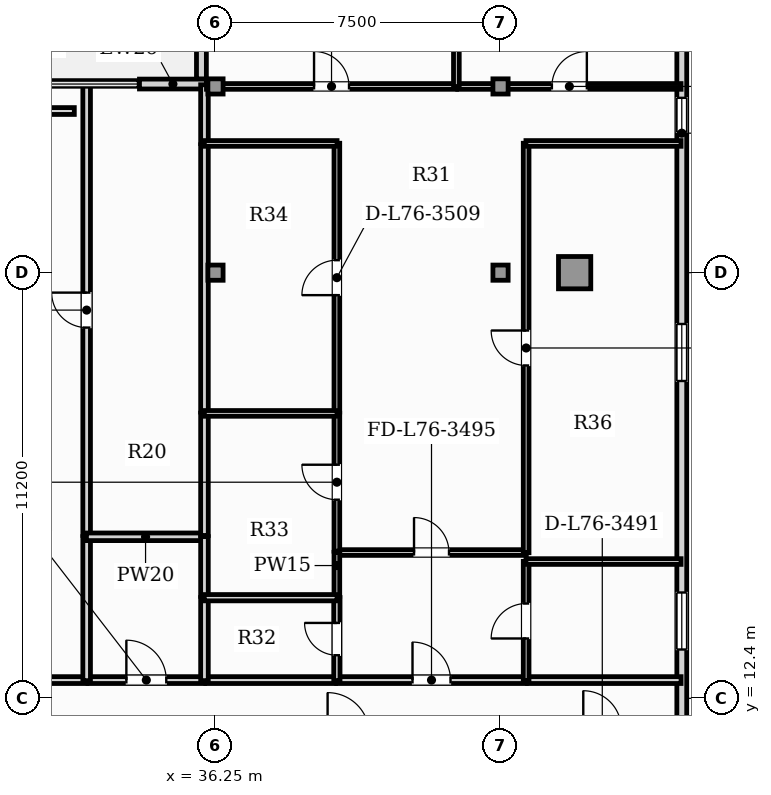
"""IFC4 building model, lengths in metres.
Left out: names, types, materials, properties, quantities, classifications, styles, units other than length and angle.
Written with IfcOpenShell. Run it as: python <this file> out.ifc"""

import sys

from ifc_helpers import new_model, si_unit, direction, frame, frame_2d, origin, origin_2d, place, context, subcontext, project, spatial, rectangle, hollow_rectangle, extrude, element, fill, save


model = new_model("IFC4")
c1 = context("Model", 3, precision=1e-05, world=origin(), true_north=direction((0.0, 1.0)))
c2 = subcontext(c1, "Body", "Model", "MODEL_VIEW")
j1 = project(units=[si_unit("LENGTHUNIT", "METRE"), si_unit("PLANEANGLEUNIT", "RADIAN")], contexts=[c1])
p1 = place(None, origin())
s1 = spatial("IfcSite", under=j1, at=p1, CompositionType="ELEMENT")
p2 = place(p1, origin())
s2 = spatial("IfcBuilding", under=s1, at=p2, CompositionType="ELEMENT")
p3 = place(p2, frame((0.0, 0.0, 308.0)))
s3 = spatial("IfcBuildingStorey", under=s2, at=p3, CompositionType="ELEMENT", Elevation=308.0)
p4 = place(p3, frame((45.7, 23.6, 0.0), z_axis=(0.0, 0.0, 1.0), x_axis=(1.0, 0.0, 0.0)))
e1 = element("IfcColumn", 1, at=p4, inside=s3, PredefinedType="USERDEFINED", context=c2, shape_type="SweptSolid", body=[
    extrude(hollow_rectangle(XDim=0.85, YDim=0.85, WallThickness=0.05, at=origin_2d()), origin(), (0.0, 0.0, 1.0), 5.05),
])
for number, where, z_axis, x_axis in (
    (2, (36.25, 23.6, 0.0), (0.0, 0.0, 1.0), (1.0, 0.0, 0.0)),
    (3, (43.75, 23.6, 0.0), (0.0, 0.0, 1.0), (1.0, 0.0, 0.0)),
    (4, (36.25, 28.5, 0.0), (0.0, 0.0, 1.0), (1.0, 0.0, 0.0)),
    (5, (43.75, 28.5, 0.0), (0.0, 0.0, 1.0), (1.0, 0.0, 0.0)),
):
    element("IfcColumn", number, at=place(p3, frame(where, z_axis=z_axis, x_axis=x_axis)), inside=s3, PredefinedType="COLUMN", context=c2, shape_type="SweptSolid", body=[
        extrude(hollow_rectangle(XDim=0.4, YDim=0.4, WallThickness=0.02, at=origin_2d()), origin(), (0.0, 0.0, 1.0), 5.05),
    ])
p5 = place(p3, frame((48.519, 3.24, 0.0), z_axis=(0.0, 0.0, 1.0), x_axis=(0.0, 1.0, 0.0)))
e6 = element("IfcWall", 6, at=p5, inside=s3, PredefinedType="SOLIDWALL", context=c2, shape_type="SweptSolid", body=[
    extrude(rectangle(XDim=26.813, YDim=0.26, at=frame_2d((13.406, 0.0))), origin(), (0.0, 0.0, 1.0), 4.85),
])
p6 = place(p5, frame((24.06, 0.0, 0.95)))
e7 = element("IfcOpeningElement", 7, at=p6, cuts=e6, PredefinedType="OPENING", context=c2, shape_type="SweptSolid", body=[
    extrude(rectangle(XDim=0.9, YDim=1.5, at=frame_2d((0.45, 0.75))), frame((0.0, 0.14, 0.0), z_axis=(0.0, -1.0, 0.0), x_axis=(1.0, 0.0, 0.0)), (0.0, 0.0, 1.0), 0.28),
])
p7 = place(p5, frame((10.445, 0.0, 0.9)))
e8 = element("IfcOpeningElement", 8, at=p7, cuts=e6, PredefinedType="OPENING", context=c2, shape_type="SweptSolid", body=[
    extrude(rectangle(XDim=1.5, YDim=1.95, at=frame_2d((0.75, 0.975))), frame((0.0, 0.14, 0.0), z_axis=(0.0, -1.0, 0.0), x_axis=(1.0, 0.0, 0.0)), (0.0, 0.0, 1.0), 0.28),
])
p8 = place(p5, frame((17.51, 0.0, 0.9)))
e9 = element("IfcOpeningElement", 9, at=p8, cuts=e6, PredefinedType="OPENING", context=c2, shape_type="SweptSolid", body=[
    extrude(rectangle(XDim=1.5, YDim=1.95, at=frame_2d((0.75, 0.975))), frame((0.0, 0.14, 0.0), z_axis=(0.0, -1.0, 0.0), x_axis=(1.0, 0.0, 0.0)), (0.0, 0.0, 1.0), 0.28),
])
p9 = place(p3, frame((35.88, 33.253, 0.0), z_axis=(0.0, 0.0, 1.0), x_axis=(0.0, -1.0, 0.0)))
e10 = element("IfcWall", 10, at=p9, inside=s3, PredefinedType="SOLIDWALL", context=c2, shape_type="SweptSolid", body=[
    extrude(rectangle(XDim=4.56, YDim=0.26, at=frame_2d((2.28, 0.0))), origin(), (0.0, 0.0, 1.0), 4.85),
])
p10 = place(p3, frame((34.25, 28.563, 0.0), z_axis=(0.0, 0.0, 1.0), x_axis=(1.0, 0.0, 0.0)))
e11 = element("IfcWall", 11, at=p10, inside=s3, PredefinedType="SOLIDWALL", context=c2, shape_type="SweptSolid", body=[
    extrude(rectangle(XDim=1.76, YDim=0.26, at=frame_2d((0.88, 0.0))), origin(), (0.0, 0.0, 1.0), 4.85),
])
p11 = place(p3, frame((21.535, 12.88, 0.0), z_axis=(0.0, 0.0, 1.0), x_axis=(1.0, 0.0, 0.0)))
e12 = element("IfcWall", 12, at=p11, inside=s3, PredefinedType="PARTITIONING", context=c2, shape_type="SweptSolid", body=[
    extrude(rectangle(XDim=11.33, YDim=0.18, at=frame_2d((5.665, 0.0))), origin(), (0.0, 0.0, 1.0), 4.85),
])
p12 = place(p11, frame((3.466, 0.0, 0.0)))
e13 = element("IfcOpeningElement", 13, at=p12, cuts=e12, PredefinedType="OPENING", context=c2, shape_type="SweptSolid", body=[
    extrude(rectangle(XDim=1.0, YDim=2.15, at=frame_2d((0.5, 1.075))), frame((0.0, 0.1, 0.0), z_axis=(0.0, -1.0, 0.0), x_axis=(1.0, 0.0, 0.0)), (0.0, 0.0, 1.0), 0.2),
])
p13 = place(p3, frame((32.895, 12.88, 0.0), z_axis=(0.0, 0.0, 1.0), x_axis=(1.0, 0.0, 0.0)))
e14 = element("IfcWall", 14, at=p13, inside=s3, PredefinedType="PARTITIONING", context=c2, shape_type="SweptSolid", body=[
    extrude(rectangle(XDim=3.07, YDim=0.18, at=frame_2d((1.535, 0.0))), origin(), (0.0, 0.0, 1.0), 4.85),
])
p14 = place(p13, frame((1.01, 0.0, 0.0)))
e15 = element("IfcOpeningElement", 15, at=p14, cuts=e14, PredefinedType="OPENING", context=c2, shape_type="SweptSolid", body=[
    extrude(rectangle(XDim=1.05, YDim=2.15, at=frame_2d((0.525, 1.075))), frame((0.0, 0.1, 0.0), z_axis=(0.0, -1.0, 0.0), x_axis=(1.0, 0.0, 0.0)), (0.0, 0.0, 1.0), 0.2),
])
p15 = place(p3, frame((39.439, 12.88, 0.0), z_axis=(0.0, 0.0, 1.0), x_axis=(1.0, 0.0, 0.0)))
e16 = element("IfcWall", 16, at=p15, inside=s3, PredefinedType="PARTITIONING", context=c2, shape_type="SweptSolid", body=[
    extrude(rectangle(XDim=4.99, YDim=0.18, at=frame_2d((2.495, 0.0))), origin(), (0.0, 0.0, 1.0), 4.85),
])
p16 = place(p15, frame((1.995, 0.0, 0.0)))
e17 = element("IfcOpeningElement", 17, at=p16, cuts=e16, PredefinedType="OPENING", context=c2, shape_type="SweptSolid", body=[
    extrude(rectangle(XDim=1.0, YDim=2.15, at=frame_2d((0.5, 1.075))), frame((0.0, 0.1, 0.0), z_axis=(0.0, -1.0, 0.0), x_axis=(1.0, 0.0, 0.0)), (0.0, 0.0, 1.0), 0.2),
])
p17 = place(p3, frame((35.995, 12.88, 0.0), z_axis=(0.0, 0.0, 1.0), x_axis=(1.0, 0.0, 0.0)))
e18 = element("IfcWall", 18, at=p17, inside=s3, PredefinedType="PARTITIONING", context=c2, shape_type="SweptSolid", body=[
    extrude(rectangle(XDim=3.414, YDim=0.18, at=frame_2d((1.707, 0.0))), origin(), (0.0, 0.0, 1.0), 4.85),
])
p18 = place(p3, frame((44.459, 12.88, 0.0), z_axis=(0.0, 0.0, 1.0), x_axis=(1.0, 0.0, 0.0)))
e19 = element("IfcWall", 19, at=p18, inside=s3, PredefinedType="PARTITIONING", context=c2, shape_type="SweptSolid", body=[
    extrude(rectangle(XDim=4.041, YDim=0.18, at=frame_2d((2.021, 0.0))), origin(), (0.0, 0.0, 1.0), 4.85),
])
p19 = place(p3, frame((32.86, 12.865, 0.0), z_axis=(0.0, 0.0, 1.0), x_axis=(0.0, 1.0, 0.0)))
e20 = element("IfcWall", 20, at=p19, inside=s3, PredefinedType="PARTITIONING", context=c2, shape_type="SweptSolid", body=[
    extrude(rectangle(XDim=3.79, YDim=0.2, at=frame_2d((1.895, 0.0))), origin(), (0.0, 0.0, 1.0), 4.85),
])
p20 = place(p3, frame((32.86, 16.685, 0.0), z_axis=(0.0, 0.0, 1.0), x_axis=(0.0, 1.0, 0.0)))
e21 = element("IfcWall", 21, at=p20, inside=s3, PredefinedType="PARTITIONING", context=c2, shape_type="SweptSolid", body=[
    extrude(rectangle(XDim=11.86, YDim=0.2, at=frame_2d((5.93, 0.0))), origin(), (0.0, 0.0, 1.0), 4.85),
])
p21 = place(p20, frame((5.47, 0.0, 0.0)))
e22 = element("IfcOpeningElement", 22, at=p21, cuts=e21, PredefinedType="OPENING", context=c2, shape_type="SweptSolid", body=[
    extrude(rectangle(XDim=0.92, YDim=2.1, at=frame_2d((0.46, 1.05))), frame((0.0, 0.11, 0.0), z_axis=(0.0, -1.0, 0.0), x_axis=(1.0, 0.0, 0.0)), (0.0, 0.0, 1.0), 0.22),
])
p22 = place(p3, frame((32.855, 16.65, 0.0), z_axis=(0.0, 0.0, 1.0), x_axis=(1.0, 0.0, 0.0)))
e23 = element("IfcWall", 23, at=p22, inside=s3, PredefinedType="PARTITIONING", context=c2, shape_type="SweptSolid", body=[
    extrude(rectangle(XDim=3.11, YDim=0.2, at=frame_2d((1.555, 0.0))), origin(), (0.0, 0.0, 1.0), 4.85),
])
p23 = place(p3, frame((35.96, 12.865, 0.0), z_axis=(0.0, 0.0, 1.0), x_axis=(0.0, 1.0, 0.0)))
e24 = element("IfcWall", 24, at=p23, inside=s3, PredefinedType="PARTITIONING", context=c2, shape_type="SweptSolid", body=[
    extrude(rectangle(XDim=2.188, YDim=0.2, at=frame_2d((1.094, 0.0))), origin(), (0.0, 0.0, 1.0), 4.85),
])
p24 = place(p3, frame((35.96, 15.083, 0.0), z_axis=(0.0, 0.0, 1.0), x_axis=(0.0, 1.0, 0.0)))
e25 = element("IfcWall", 25, at=p24, inside=s3, PredefinedType="PARTITIONING", context=c2, shape_type="SweptSolid", body=[
    extrude(rectangle(XDim=1.573, YDim=0.2, at=frame_2d((0.786, 0.0))), origin(), (0.0, 0.0, 1.0), 4.85),
])
p25 = place(p3, frame((35.96, 26.995, 0.0), z_axis=(0.0, 0.0, 1.0), x_axis=(0.0, 1.0, 0.0)))
e26 = element("IfcWall", 26, at=p25, inside=s3, PredefinedType="PARTITIONING", context=c2, shape_type="SweptSolid", body=[
    extrude(rectangle(XDim=1.549, YDim=0.2, at=frame_2d((0.774, 0.0))), origin(), (0.0, 0.0, 1.0), 4.85),
])
p26 = place(p3, frame((35.96, 16.685, 0.0), z_axis=(0.0, 0.0, 1.0), x_axis=(0.0, 1.0, 0.0)))
e27 = element("IfcWall", 27, at=p26, inside=s3, PredefinedType="PARTITIONING", context=c2, shape_type="SweptSolid", body=[
    extrude(rectangle(XDim=3.217, YDim=0.2, at=frame_2d((1.608, 0.0))), origin(), (0.0, 0.0, 1.0), 4.85),
])
p27 = place(p3, frame((35.96, 19.932, 0.0), z_axis=(0.0, 0.0, 1.0), x_axis=(0.0, 1.0, 0.0)))
e28 = element("IfcWall", 28, at=p27, inside=s3, PredefinedType="PARTITIONING", context=c2, shape_type="SweptSolid", body=[
    extrude(rectangle(XDim=7.033, YDim=0.2, at=frame_2d((3.517, 0.0))), origin(), (0.0, 0.0, 1.0), 4.85),
])
p28 = place(p3, frame((39.439, 16.236, 0.0), z_axis=(0.0, 0.0, 1.0), x_axis=(1.0, 0.0, 0.0)))
e29 = element("IfcWall", 29, at=p28, inside=s3, PredefinedType="PARTITIONING", context=c2, shape_type="SweptSolid", body=[
    extrude(rectangle(XDim=4.99, YDim=0.15, at=frame_2d((2.495, 0.0))), origin(), (0.0, 0.0, 1.0), 4.85),
])
p29 = place(p28, frame((2.035, 0.0, 0.0)))
e30 = element("IfcOpeningElement", 30, at=p29, cuts=e29, PredefinedType="OPENING", context=c2, shape_type="SweptSolid", body=[
    extrude(rectangle(XDim=0.92, YDim=2.1, at=frame_2d((0.46, 1.05))), frame((0.0, 0.085, 0.0), z_axis=(0.0, -1.0, 0.0), x_axis=(1.0, 0.0, 0.0)), (0.0, 0.0, 1.0), 0.17),
])
p30 = place(p3, frame((39.444, 12.865, 0.0), z_axis=(0.0, 0.0, 1.0), x_axis=(0.0, 1.0, 0.0)))
e31 = element("IfcWall", 31, at=p30, inside=s3, PredefinedType="PLUMBINGWALL", context=c2, shape_type="SweptSolid", body=[
    extrude(rectangle(XDim=2.188, YDim=0.165, at=frame_2d((1.094, 0.0))), origin(), (0.0, 0.0, 1.0), 4.85),
])
p31 = place(p30, frame((0.669, 0.0, 0.0)))
e32 = element("IfcOpeningElement", 32, at=p31, cuts=e31, PredefinedType="OPENING", context=c2, shape_type="SweptSolid", body=[
    extrude(rectangle(XDim=0.85, YDim=2.1, at=frame_2d((0.425, 1.05))), frame((0.0, 0.093, 0.0), z_axis=(0.0, -1.0, 0.0), x_axis=(1.0, 0.0, 0.0)), (0.0, 0.0, 1.0), 0.185),
])
p32 = place(p3, frame((39.444, 15.083, 0.0), z_axis=(0.0, 0.0, 1.0), x_axis=(0.0, 1.0, 0.0)))
e33 = element("IfcWall", 33, at=p32, inside=s3, PredefinedType="PARTITIONING", context=c2, shape_type="SweptSolid", body=[
    extrude(rectangle(XDim=1.159, YDim=0.15, at=frame_2d((0.579, 0.0))), origin(), (0.0, 0.0, 1.0), 4.85),
])
p33 = place(p3, frame((44.424, 12.865, 0.0), z_axis=(0.0, 0.0, 1.0), x_axis=(0.0, 1.0, 0.0)))
e34 = element("IfcWall", 34, at=p33, inside=s3, PredefinedType="PARTITIONING", context=c2, shape_type="SweptSolid", body=[
    extrude(rectangle(XDim=3.139, YDim=0.15, at=frame_2d((1.57, 0.0))), origin(), (0.0, 0.0, 1.0), 4.85),
])
p34 = place(p33, frame((1.11, 0.0, 0.0)))
e35 = element("IfcOpeningElement", 35, at=p34, cuts=e34, PredefinedType="OPENING", context=c2, shape_type="SweptSolid", body=[
    extrude(rectangle(XDim=0.92, YDim=2.1, at=frame_2d((0.46, 1.05))), frame((0.0, 0.085, 0.0), z_axis=(0.0, -1.0, 0.0), x_axis=(1.0, 0.0, 0.0)), (0.0, 0.0, 1.0), 0.17),
])
p35 = place(p3, frame((39.444, 16.271, 0.0), z_axis=(0.0, 0.0, 1.0), x_axis=(0.0, 1.0, 0.0)))
e36 = element("IfcWall", 36, at=p35, inside=s3, PredefinedType="PARTITIONING", context=c2, shape_type="SweptSolid", body=[
    extrude(rectangle(XDim=3.631, YDim=0.15, at=frame_2d((1.815, 0.0))), origin(), (0.0, 0.0, 1.0), 4.85),
])
p36 = place(p35, frame((1.355, 0.0, 0.0)))
e37 = element("IfcOpeningElement", 37, at=p36, cuts=e36, PredefinedType="OPENING", context=c2, shape_type="SweptSolid", body=[
    extrude(rectangle(XDim=0.92, YDim=2.1, at=frame_2d((0.46, 1.05))), frame((0.0, 0.085, 0.0), z_axis=(0.0, -1.0, 0.0), x_axis=(1.0, 0.0, 0.0)), (0.0, 0.0, 1.0), 0.17),
])
p37 = place(p3, frame((39.444, 19.932, 0.0), z_axis=(0.0, 0.0, 1.0), x_axis=(0.0, 1.0, 0.0)))
e38 = element("IfcWall", 38, at=p37, inside=s3, PredefinedType="PARTITIONING", context=c2, shape_type="SweptSolid", body=[
    extrude(rectangle(XDim=7.073, YDim=0.15, at=frame_2d((3.537, 0.0))), origin(), (0.0, 0.0, 1.0), 4.85),
])
p38 = place(p37, frame((3.076, 0.0, 0.0)))
e39 = element("IfcOpeningElement", 39, at=p38, cuts=e38, PredefinedType="OPENING", context=c2, shape_type="SweptSolid", body=[
    extrude(rectangle(XDim=0.92, YDim=2.1, at=frame_2d((0.46, 1.05))), frame((0.0, 0.085, 0.0), z_axis=(0.0, -1.0, 0.0), x_axis=(1.0, 0.0, 0.0)), (0.0, 0.0, 1.0), 0.17),
])
p39 = place(p3, frame((35.955, 27.0, 0.0), z_axis=(0.0, 0.0, 1.0), x_axis=(1.0, 0.0, 0.0)))
e40 = element("IfcWall", 40, at=p39, inside=s3, PredefinedType="PARTITIONING", context=c2, shape_type="SweptSolid", body=[
    extrude(rectangle(XDim=3.494, YDim=0.15, at=frame_2d((1.747, 0.0))), origin(), (0.0, 0.0, 1.0), 4.85),
])
p40 = place(p3, frame((44.424, 16.231, 0.0), z_axis=(0.0, 0.0, 1.0), x_axis=(0.0, 1.0, 0.0)))
e41 = element("IfcWall", 41, at=p40, inside=s3, PredefinedType="PARTITIONING", context=c2, shape_type="SweptSolid", body=[
    extrude(rectangle(XDim=10.774, YDim=0.15, at=frame_2d((5.387, 0.0))), origin(), (0.0, 0.0, 1.0), 4.85),
])
p41 = place(p40, frame((4.927, 0.0, 0.0)))
e42 = element("IfcOpeningElement", 42, at=p41, cuts=e41, PredefinedType="OPENING", context=c2, shape_type="SweptSolid", body=[
    extrude(rectangle(XDim=0.92, YDim=2.1, at=frame_2d((0.46, 1.05))), frame((0.0, 0.085, 0.0), z_axis=(0.0, -1.0, 0.0), x_axis=(1.0, 0.0, 0.0)), (0.0, 0.0, 1.0), 0.17),
])
p42 = place(p3, frame((44.419, 27.0, 0.0), z_axis=(0.0, 0.0, 1.0), x_axis=(1.0, 0.0, 0.0)))
e43 = element("IfcWall", 43, at=p42, inside=s3, PredefinedType="PARTITIONING", context=c2, shape_type="SweptSolid", body=[
    extrude(rectangle(XDim=4.081, YDim=0.15, at=frame_2d((2.041, 0.0))), origin(), (0.0, 0.0, 1.0), 4.85),
])
p43 = place(p3, frame((36.013, 28.5, 0.0), z_axis=(0.0, 0.0, 1.0), x_axis=(1.0, 0.0, 0.0)))
e44 = element("IfcWall", 44, at=p43, inside=s3, PredefinedType="PARTITIONING", context=c2, shape_type="SweptSolid", body=[
    extrude(rectangle(XDim=6.58, YDim=0.15, at=frame_2d((3.29, 0.0))), origin(), (0.0, 0.0, 1.0), 4.317),
])
p44 = place(p43, frame((2.83, 0.0, 0.0)))
e45 = element("IfcOpeningElement", 45, at=p44, cuts=e44, PredefinedType="OPENING", context=c2, shape_type="SweptSolid", body=[
    extrude(rectangle(XDim=0.92, YDim=2.1, at=frame_2d((0.46, 1.05))), frame((0.0, 0.085, 0.0), z_axis=(0.0, -1.0, 0.0), x_axis=(1.0, 0.0, 0.0)), (0.0, 0.0, 1.0), 0.17),
])
p45 = place(p3, frame((42.623, 28.5, 0.0), z_axis=(0.0, 0.0, 1.0), x_axis=(1.0, 0.0, 0.0)))
e46 = element("IfcWall", 46, at=p45, inside=s3, PredefinedType="PARTITIONING", context=c2, shape_type="SweptSolid", body=[
    extrude(rectangle(XDim=5.876, YDim=0.15, at=frame_2d((2.938, 0.0))), origin(), (0.0, 0.0, 1.0), 4.317),
])
p46 = place(p45, frame((2.478, 0.0, 0.0)))
e47 = element("IfcOpeningElement", 47, at=p46, cuts=e46, PredefinedType="OPENING", context=c2, shape_type="SweptSolid", body=[
    extrude(rectangle(XDim=0.92, YDim=2.1, at=frame_2d((0.46, 1.05))), frame((0.0, 0.085, 0.0), z_axis=(0.0, -1.0, 0.0), x_axis=(1.0, 0.0, 0.0)), (0.0, 0.0, 1.0), 0.17),
])
p47 = place(p3, frame((35.955, 15.048, 0.0), z_axis=(0.0, 0.0, 1.0), x_axis=(1.0, 0.0, 0.0)))
e48 = element("IfcWall", 48, at=p47, inside=s3, PredefinedType="PLUMBINGWALL", context=c2, shape_type="SweptSolid", body=[
    extrude(rectangle(XDim=3.494, YDim=0.165, at=frame_2d((1.747, 0.0))), origin(), (0.0, 0.0, 1.0), 4.85),
])
p48 = place(p3, frame((35.955, 19.897, 0.0), z_axis=(0.0, 0.0, 1.0), x_axis=(1.0, 0.0, 0.0)))
e49 = element("IfcWall", 49, at=p48, inside=s3, PredefinedType="PARTITIONING", context=c2, shape_type="SweptSolid", body=[
    extrude(rectangle(XDim=3.494, YDim=0.15, at=frame_2d((1.747, 0.0))), origin(), (0.0, 0.0, 1.0), 4.85),
])
p49 = place(p3, frame((44.419, 15.999, 0.0), z_axis=(0.0, 0.0, 1.0), x_axis=(1.0, 0.0, 0.0)))
e50 = element("IfcWall", 50, at=p49, inside=s3, PredefinedType="PARTITIONING", context=c2, shape_type="SweptSolid", body=[
    extrude(rectangle(XDim=4.081, YDim=0.15, at=frame_2d((2.041, 0.0))), origin(), (0.0, 0.0, 1.0), 4.85),
])
p50 = place(p3, frame((42.588, 28.495, 0.0), z_axis=(0.0, 0.0, 1.0), x_axis=(0.0, 1.0, 0.0)))
e51 = element("IfcWall", 51, at=p50, inside=s3, PredefinedType="PARTITIONING", context=c2, shape_type="SweptSolid", body=[
    extrude(rectangle(XDim=4.648, YDim=0.15, at=frame_2d((2.324, 0.0))), origin(), (0.0, 0.0, 1.0), 4.85),
])
p51 = place(p3, frame((24.183, 27.853, 0.0), z_axis=(0.0, 0.0, 1.0), x_axis=(1.0, 0.0, 0.0)))
e52 = element("IfcWall", 52, at=p51, inside=s3, PredefinedType="PARTITIONING", context=c2, shape_type="SweptSolid", body=[
    extrude(rectangle(XDim=8.352, YDim=0.18, at=frame_2d((4.176, 0.0))), origin(), (0.0, 0.0, 1.0), 4.85),
])
p52 = place(p6, origin())
e53 = element("IfcWindow", 53, at=p52, inside=s3, PartitioningType="SINGLE_PANEL", PredefinedType="WINDOW", context=c2, shape_type="SweptSolid", body=[
    extrude(rectangle(XDim=0.9, YDim=1.5, at=frame_2d((0.45, 0.75))), frame((0.0, 0.03, 0.0), z_axis=(0.0, -1.0, 0.0), x_axis=(1.0, 0.0, 0.0)), (0.0, 0.0, 1.0), 0.06),
])
fill(e7, e53)
p53 = place(p7, origin())
e54 = element("IfcWindow", 54, at=p53, inside=s3, PartitioningType="SINGLE_PANEL", PredefinedType="WINDOW", context=c2, shape_type="SweptSolid", body=[
    extrude(rectangle(XDim=1.5, YDim=1.95, at=frame_2d((0.75, 0.975))), frame((0.0, 0.03, 0.0), z_axis=(0.0, -1.0, 0.0), x_axis=(1.0, 0.0, 0.0)), (0.0, 0.0, 1.0), 0.06),
])
fill(e8, e54)
p54 = place(p8, origin())
e55 = element("IfcWindow", 55, at=p54, inside=s3, PartitioningType="SINGLE_PANEL", PredefinedType="WINDOW", context=c2, shape_type="SweptSolid", body=[
    extrude(rectangle(XDim=1.5, YDim=1.95, at=frame_2d((0.75, 0.975))), frame((0.0, 0.03, 0.0), z_axis=(0.0, -1.0, 0.0), x_axis=(1.0, 0.0, 0.0)), (0.0, 0.0, 1.0), 0.06),
])
fill(e9, e55)
p55 = place(p14, origin())
e56 = element("IfcDoor", 56, at=p55, inside=s3, OperationType="SINGLE_SWING_LEFT", PredefinedType="DOOR", context=c2, shape_type="SweptSolid", body=[
    extrude(rectangle(XDim=1.05, YDim=2.15, at=frame_2d((0.525, 1.075))), frame((0.0, 0.025, 0.0), z_axis=(0.0, -1.0, 0.0), x_axis=(1.0, 0.0, 0.0)), (0.0, 0.0, 1.0), 0.05),
])
fill(e15, e56)
p56 = place(p16, origin())
e57 = element("IfcDoor", 57, at=p56, inside=s3, OperationType="SINGLE_SWING_LEFT", PredefinedType="DOOR", context=c2, shape_type="SweptSolid", body=[
    extrude(rectangle(XDim=1.0, YDim=2.15, at=frame_2d((0.5, 1.075))), frame((0.0, 0.025, 0.0), z_axis=(0.0, -1.0, 0.0), x_axis=(1.0, 0.0, 0.0)), (0.0, 0.0, 1.0), 0.05),
])
fill(e17, e57)
p57 = place(p21, origin())
e58 = element("IfcDoor", 58, at=p57, inside=s3, OperationType="SINGLE_SWING_RIGHT", PredefinedType="DOOR", context=c2, shape_type="SweptSolid", body=[
    extrude(rectangle(XDim=0.92, YDim=2.1, at=frame_2d((0.46, 1.05))), frame((0.0, 0.025, 0.0), z_axis=(0.0, -1.0, 0.0), x_axis=(1.0, 0.0, 0.0)), (0.0, 0.0, 1.0), 0.05),
])
fill(e22, e58)
p58 = place(p29, origin())
e59 = element("IfcDoor", 59, at=p58, inside=s3, OperationType="SINGLE_SWING_LEFT", PredefinedType="DOOR", context=c2, shape_type="SweptSolid", body=[
    extrude(rectangle(XDim=0.92, YDim=2.1, at=frame_2d((0.46, 1.05))), frame((0.0, 0.025, 0.0), z_axis=(0.0, -1.0, 0.0), x_axis=(1.0, 0.0, 0.0)), (0.0, 0.0, 1.0), 0.05),
])
fill(e30, e59)
p59 = place(p31, origin())
e60 = element("IfcDoor", 60, at=p59, inside=s3, OperationType="SINGLE_SWING_RIGHT", PredefinedType="DOOR", context=c2, shape_type="SweptSolid", body=[
    extrude(rectangle(XDim=0.85, YDim=2.1, at=frame_2d((0.425, 1.05))), frame((0.0, 0.025, 0.0), z_axis=(0.0, -1.0, 0.0), x_axis=(1.0, 0.0, 0.0)), (0.0, 0.0, 1.0), 0.05),
])
fill(e32, e60)
p60 = place(p34, origin())
e61 = element("IfcDoor", 61, at=p60, inside=s3, OperationType="SINGLE_SWING_LEFT", PredefinedType="DOOR", context=c2, shape_type="SweptSolid", body=[
    extrude(rectangle(XDim=0.92, YDim=2.1, at=frame_2d((0.46, 1.05))), frame((0.0, 0.025, 0.0), z_axis=(0.0, -1.0, 0.0), x_axis=(1.0, 0.0, 0.0)), (0.0, 0.0, 1.0), 0.05),
])
fill(e35, e61)
p61 = place(p36, origin())
e62 = element("IfcDoor", 62, at=p61, inside=s3, OperationType="SINGLE_SWING_RIGHT", PredefinedType="DOOR", context=c2, shape_type="SweptSolid", body=[
    extrude(rectangle(XDim=0.92, YDim=2.1, at=frame_2d((0.46, 1.05))), frame((0.0, 0.025, 0.0), z_axis=(0.0, -1.0, 0.0), x_axis=(1.0, 0.0, 0.0)), (0.0, 0.0, 1.0), 0.05),
])
fill(e37, e62)
p62 = place(p38, origin())
e63 = element("IfcDoor", 63, at=p62, inside=s3, OperationType="SINGLE_SWING_LEFT", PredefinedType="DOOR", context=c2, shape_type="SweptSolid", body=[
    extrude(rectangle(XDim=0.92, YDim=2.1, at=frame_2d((0.46, 1.05))), frame((0.0, 0.025, 0.0), z_axis=(0.0, -1.0, 0.0), x_axis=(1.0, 0.0, 0.0)), (0.0, 0.0, 1.0), 0.05),
])
fill(e39, e63)
p63 = place(p41, origin())
e64 = element("IfcDoor", 64, at=p63, inside=s3, OperationType="SINGLE_SWING_RIGHT", PredefinedType="DOOR", context=c2, shape_type="SweptSolid", body=[
    extrude(rectangle(XDim=0.92, YDim=2.1, at=frame_2d((0.46, 1.05))), frame((0.0, 0.025, 0.0), z_axis=(0.0, -1.0, 0.0), x_axis=(1.0, 0.0, 0.0)), (0.0, 0.0, 1.0), 0.05),
])
fill(e42, e64)
p64 = place(p44, origin())
e65 = element("IfcDoor", 65, at=p64, inside=s3, OperationType="SINGLE_SWING_LEFT", PredefinedType="DOOR", context=c2, shape_type="SweptSolid", body=[
    extrude(rectangle(XDim=0.92, YDim=2.1, at=frame_2d((0.46, 1.05))), frame((0.0, 0.025, 0.0), z_axis=(0.0, -1.0, 0.0), x_axis=(1.0, 0.0, 0.0)), (0.0, 0.0, 1.0), 0.05),
])
fill(e45, e65)
p65 = place(p46, origin())
e66 = element("IfcDoor", 66, at=p65, inside=s3, OperationType="SINGLE_SWING_RIGHT", PredefinedType="DOOR", context=c2, shape_type="SweptSolid", body=[
    extrude(rectangle(XDim=0.92, YDim=2.1, at=frame_2d((0.46, 1.05))), frame((0.0, 0.025, 0.0), z_axis=(0.0, -1.0, 0.0), x_axis=(1.0, 0.0, 0.0)), (0.0, 0.0, 1.0), 0.05),
])
fill(e47, e66)
save(model, sys.argv[1])
